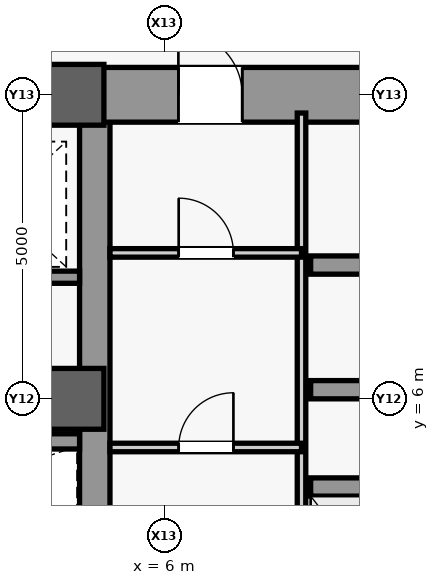
"""IFC4 building model, lengths in metres.
Left out: names, types, materials, properties, quantities, classifications, styles, units other than length and angle.
Written with IfcOpenShell. Run it as: python <this file> out.ifc"""

import sys

from ifc_helpers import new_model, si_unit, direction, frame, frame_2d, origin, origin_2d, place, context, subcontext, project, spatial, rectangle, extrude, source, transform, mapped, element, fill, save


model = new_model("IFC4")
c1 = context("Model", 3, precision=1e-05, world=origin(), true_north=direction((0.0, 1.0)))
c2 = subcontext(c1, "Body", "Model", "MODEL_VIEW")
j1 = project(units=[si_unit("LENGTHUNIT", "METRE"), si_unit("PLANEANGLEUNIT", "RADIAN")], contexts=[c1])
p1 = place(None, origin())
s1 = spatial("IfcSite", under=j1, at=p1, CompositionType="ELEMENT")
p2 = place(p1, origin())
s2 = spatial("IfcBuilding", under=s1, at=p2, CompositionType="ELEMENT")
p3 = place(p2, frame((0.0, 0.0, 32.6)))
s3 = spatial("IfcBuildingStorey", under=s2, at=p3, CompositionType="ELEMENT", Elevation=32.6)
m1 = source(origin(), c2, "Body", "SweptSolid", [
    extrude(rectangle(XDim=21.4, YDim=0.5, at=frame_2d((10.7, 0.0))), origin(), (0.0, 0.0, 1.0), 3.94),
])
p4 = place(p3, frame((4.85, -10.7, 0.0), z_axis=(0.0, 0.0, 1.0), x_axis=(0.0, 1.0, 0.0)))
e1 = element("IfcWall", 1, at=p4, inside=s3, PredefinedType="SHEAR", context=c2, shape_type="MappedRepresentation", body=[
    mapped(m1, transform((0.0, 0.0, 0.0), scale=1.0)),
])
m2 = source(origin(), c2, "Body", "SweptSolid", [
    extrude(rectangle(XDim=5.85, YDim=0.9, at=frame_2d((2.925, 0.0))), origin(), (0.0, 0.0, 1.0), 3.94),
])
p5 = place(p3, frame((4.85, 11.0, 0.0), z_axis=(0.0, 0.0, 1.0), x_axis=(1.0, 0.0, 0.0)))
e2 = element("IfcWall", 2, at=p5, inside=s3, PredefinedType="SHEAR", context=c2, shape_type="MappedRepresentation", body=[
    mapped(m2, transform((0.0, 0.0, 0.0), scale=1.0)),
])
m3 = source(origin(), c2, "Body", "SweptSolid", [
    extrude(rectangle(XDim=1.05, YDim=2.2, at=frame_2d((0.525, 1.1))), frame((0.0, 0.46, 0.0), z_axis=(0.0, -1.0, 0.0), x_axis=(1.0, 0.0, 0.0)), (0.0, 0.0, 1.0), 0.92),
])
p6 = place(p5, frame((1.375, 0.0, 0.0)))
e3 = element("IfcOpeningElement", 3, at=p6, cuts=e2, PredefinedType="OPENING", context=c2, shape_type="MappedRepresentation", body=[
    mapped(m3, transform((0.0, 0.0, 0.0), scale=1.0)),
])
m4 = source(origin(), c2, "Body", "SweptSolid", [
    extrude(rectangle(XDim=9.2, YDim=0.5, at=frame_2d((4.6, 0.0))), origin(), (0.0, 0.0, 1.0), 3.94),
])
p7 = place(p3, frame((-4.6, 11.0, 0.0), z_axis=(0.0, 0.0, 1.0), x_axis=(1.0, 0.0, 0.0)))
e4 = element("IfcWall", 4, at=p7, inside=s3, PredefinedType="SHEAR", context=c2, shape_type="MappedRepresentation", body=[
    mapped(m4, transform((0.0, 0.0, 0.0), scale=1.0)),
])
m5 = source(origin(), c2, "Body", "SweptSolid", [
    extrude(rectangle(XDim=1.8, YDim=2.25, at=frame_2d((0.9, 1.125))), frame((0.0, 0.26, 0.0), z_axis=(0.0, -1.0, 0.0), x_axis=(1.0, 0.0, 0.0)), (0.0, 0.0, 1.0), 0.52),
])
p8 = place(p7, frame((3.7, 0.0, 0.0)))
e5 = element("IfcOpeningElement", 5, at=p8, cuts=e4, PredefinedType="OPENING", context=c2, shape_type="MappedRepresentation", body=[
    mapped(m5, transform((0.0, 0.0, 0.0), scale=1.0)),
])
m6 = source(origin(), c2, "Body", "SweptSolid", [
    extrude(rectangle(XDim=1.0, YDim=1.0, at=origin_2d()), origin(), (0.0, 0.0, 1.0), 4.2),
])
for number, where, z_axis, x_axis in (
    (6, (4.5, 6.0, 0.0), (0.0, 0.0, 1.0), (1.0, 0.0, 0.0)),
    (7, (4.5, 11.0, 0.0), (0.0, 0.0, 1.0), (1.0, 0.0, 0.0)),
):
    element("IfcColumn", number, at=place(p3, frame(where, z_axis=z_axis, x_axis=x_axis)), inside=s3, PredefinedType="COLUMN", context=c2, shape_type="MappedRepresentation", body=[
        mapped(m6, transform((0.0, 0.0, 0.0), scale=1.0)),
    ])
m7 = source(origin(), c2, "Body", "SweptSolid", [
    extrude(rectangle(XDim=2.3, YDim=0.3, at=frame_2d((1.15, 0.0))), origin(), (0.0, 0.0, 1.0), 3.94),
])
for number, where, z_axis, x_axis in (
    (8, (8.4, 4.55, 0.0), (0.0, 0.0, 1.0), (1.0, 0.0, 0.0)),
    (9, (8.4, 6.15, 0.0), (0.0, 0.0, 1.0), (1.0, 0.0, 0.0)),
    (10, (8.4, 8.2, 0.0), (0.0, 0.0, 1.0), (1.0, 0.0, 0.0)),
):
    element("IfcWall", number, at=place(p3, frame(where, z_axis=z_axis, x_axis=x_axis)), inside=s3, PredefinedType="SHEAR", context=c2, shape_type="MappedRepresentation", body=[
        mapped(m7, transform((0.0, 0.0, 0.0), scale=1.0)),
    ])
m8 = source(origin(), c2, "Body", "SweptSolid", [
    extrude(rectangle(XDim=9.4, YDim=0.14, at=frame_2d((4.7, 0.0))), origin(), (0.0, 0.0, 1.0), 3.94),
])
p9 = place(p3, frame((8.25, 1.3, 0.0), z_axis=(0.0, 0.0, 1.0), x_axis=(0.0, 1.0, 0.0)))
e11 = element("IfcWall", 11, at=p9, inside=s3, PredefinedType="PARTITIONING", context=c2, shape_type="MappedRepresentation", body=[
    mapped(m8, transform((0.0, 0.0, 0.0), scale=1.0)),
])
m9 = source(origin(), c2, "Body", "SweptSolid", [
    extrude(rectangle(XDim=3.15, YDim=0.14, at=frame_2d((1.575, 0.0))), origin(), (0.0, 0.0, 1.0), 3.94),
])
p10 = place(p3, frame((5.1, 8.4, 0.0), z_axis=(0.0, 0.0, 1.0), x_axis=(1.0, 0.0, 0.0)))
e12 = element("IfcWall", 12, at=p10, inside=s3, PredefinedType="PARTITIONING", context=c2, shape_type="MappedRepresentation", body=[
    mapped(m9, transform((0.0, 0.0, 0.0), scale=1.0)),
])
m10 = source(origin(), c2, "Body", "SweptSolid", [
    extrude(rectangle(XDim=0.9, YDim=2.15, at=frame_2d((0.45, 1.075))), frame((0.0, 0.08, 0.0), z_axis=(0.0, -1.0, 0.0), x_axis=(1.0, 0.0, 0.0)), (0.0, 0.0, 1.0), 0.16),
])
p11 = place(p10, frame((1.13, 0.0, 0.0)))
e13 = element("IfcOpeningElement", 13, at=p11, cuts=e12, PredefinedType="OPENING", context=c2, shape_type="MappedRepresentation", body=[
    mapped(m10, transform((0.0, 0.0, 0.0), scale=1.0)),
])
p12 = place(p3, frame((5.1, 5.2, 0.0), z_axis=(0.0, 0.0, 1.0), x_axis=(1.0, 0.0, 0.0)))
e14 = element("IfcWall", 14, at=p12, inside=s3, PredefinedType="PARTITIONING", context=c2, shape_type="MappedRepresentation", body=[
    mapped(m9, transform((0.0, 0.0, 0.0), scale=1.0)),
])
p13 = place(p12, frame((1.13, 0.0, 0.0)))
e15 = element("IfcOpeningElement", 15, at=p13, cuts=e14, PredefinedType="OPENING", context=c2, shape_type="MappedRepresentation", body=[
    mapped(m10, transform((0.0, 0.0, 0.0), scale=1.0)),
])
m11 = source(origin(), c2, "Body", "SweptSolid", [
    extrude(rectangle(XDim=2.45, YDim=0.2, at=frame_2d((1.225, 0.0))), origin(), (0.0, 0.0, 1.0), 3.94),
])
p14 = place(p3, frame((2.15, 8.0, 0.0), z_axis=(0.0, 0.0, 1.0), x_axis=(1.0, 0.0, 0.0)))
e16 = element("IfcWall", 16, at=p14, inside=s3, PredefinedType="SHEAR", context=c2, shape_type="MappedRepresentation", body=[
    mapped(m11, transform((0.0, 0.0, 0.0), scale=1.0)),
])
m12 = source(origin(), c2, "Body", "SweptSolid", [
    extrude(rectangle(XDim=9.2, YDim=0.25, at=frame_2d((4.6, 0.0))), origin(), (0.0, 0.0, 1.0), 3.94),
])
p15 = place(p3, frame((-4.6, 5.3, 0.0), z_axis=(0.0, 0.0, 1.0), x_axis=(1.0, 0.0, 0.0)))
e17 = element("IfcWall", 17, at=p15, inside=s3, PredefinedType="SHEAR", context=c2, shape_type="MappedRepresentation", body=[
    mapped(m12, transform((0.0, 0.0, 0.0), scale=1.0)),
])
m13 = source(origin(), c2, "Body", "SweptSolid", [
    extrude(rectangle(XDim=1.05, YDim=2.2, at=frame_2d((0.525, 1.1))), frame((0.0, 0.135, 0.0), z_axis=(0.0, -1.0, 0.0), x_axis=(1.0, 0.0, 0.0)), (0.0, 0.0, 1.0), 0.27),
])
p16 = place(p15, frame((4.075, 0.0, 0.0)))
e18 = element("IfcOpeningElement", 18, at=p16, cuts=e17, PredefinedType="OPENING", context=c2, shape_type="MappedRepresentation", body=[
    mapped(m13, transform((0.0, 0.0, 0.0), scale=1.0)),
])
m14 = source(origin(), c2, "Body", "SweptSolid", [
    extrude(rectangle(XDim=1.05, YDim=2.2, at=frame_2d((0.525, 1.1))), frame((0.0, 0.025, 0.0), z_axis=(0.0, -1.0, 0.0), x_axis=(1.0, 0.0, 0.0)), (0.0, 0.0, 1.0), 0.05),
])
p17 = place(p6, origin())
e19 = element("IfcDoor", 19, at=p17, inside=s3, OperationType="SINGLE_SWING_LEFT", PredefinedType="DOOR", context=c2, shape_type="MappedRepresentation", body=[
    mapped(m14, transform((0.0, 0.0, 0.0), scale=1.0)),
])
fill(e3, e19)
m15 = source(origin(), c2, "Body", "SweptSolid", [
    extrude(rectangle(XDim=0.9, YDim=2.15, at=frame_2d((0.45, 1.075))), frame((0.0, 0.025, 0.0), z_axis=(0.0, -1.0, 0.0), x_axis=(1.0, 0.0, 0.0)), (0.0, 0.0, 1.0), 0.05),
])
p18 = place(p11, origin())
e20 = element("IfcDoor", 20, at=p18, inside=s3, OperationType="SINGLE_SWING_LEFT", PredefinedType="DOOR", context=c2, shape_type="MappedRepresentation", body=[
    mapped(m15, transform((0.0, 0.0, 0.0), scale=1.0)),
])
fill(e13, e20)
p19 = place(p13, origin())
e21 = element("IfcDoor", 21, at=p19, inside=s3, OperationType="SINGLE_SWING_RIGHT", PredefinedType="DOOR", context=c2, shape_type="MappedRepresentation", body=[
    mapped(m15, transform((0.0, 0.0, 0.0), scale=1.0)),
])
fill(e15, e21)
save(model, sys.argv[1])
